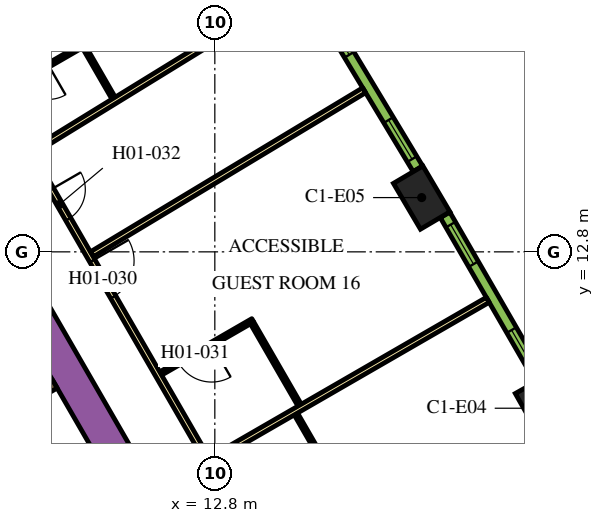
"""IFC4 building model, lengths in metres.
Left out: names, types, materials, properties, quantities, classifications, styles, units other than length and angle.
Written with IfcOpenShell. Run it as: python <this file> out.ifc"""

import sys

from ifc_helpers import new_model, si_unit, direction, frame, frame_2d, origin, origin_2d, place, context, subcontext, project, spatial, rectangle, extrude, element, fill, save


model = new_model("IFC4")
c1 = context("Model", 3, precision=1e-05, world=origin(), true_north=direction((0.0, 1.0)))
c2 = subcontext(c1, "Body", "Model", "MODEL_VIEW")
j1 = project(units=[si_unit("LENGTHUNIT", "METRE"), si_unit("PLANEANGLEUNIT", "RADIAN")], contexts=[c1])
p1 = place(None, origin())
s1 = spatial("IfcSite", under=j1, at=p1, CompositionType="ELEMENT")
p2 = place(p1, origin())
s2 = spatial("IfcBuilding", under=s1, at=p2, CompositionType="ELEMENT")
p3 = place(p2, frame((0.0, 0.0, 31.5)))
s3 = spatial("IfcBuildingStorey", under=s2, at=p3, CompositionType="ELEMENT", Elevation=31.5)
for number, where, z_axis, x_axis in (
    (1, (21.443, 8.685, 0.0), (0.0, 0.0, 1.0), (-0.492, 0.871, 0.0)),
    (2, (18.243, 14.228, 0.0), (0.0, 0.0, 1.0), (-0.508, 0.861, 0.0)),
):
    element("IfcColumn", number, at=place(p3, frame(where, z_axis=z_axis, x_axis=x_axis)), inside=s3, PredefinedType="COLUMN", context=c2, shape_type="SweptSolid", body=[
        extrude(rectangle(XDim=1.4, YDim=0.9, at=origin_2d()), origin(), (0.0, 0.0, 1.0), 3.9),
    ])
p4 = place(p3, frame((6.711, 13.476, 0.0), z_axis=(0.0, 0.0, 1.0), x_axis=(0.500002723396, -0.866023831425, 0.0)))
e3 = element("IfcWall", 3, at=p4, inside=s3, PredefinedType="SOLIDWALL", context=c2, shape_type="SweptSolid", body=[
    extrude(rectangle(XDim=20.334, YDim=0.9, at=frame_2d((10.167, 0.0))), origin(), (0.0, 0.0, 1.0), 3.9),
])
p5 = place(p3, frame((6.684, 8.224, 0.0), z_axis=(0.0, 0.0, 1.0), x_axis=(0.86605622881, 0.499946605688, 0.0)))
e4 = element("IfcWall", 4, at=p5, inside=s3, PredefinedType="SOLIDWALL", context=c2, shape_type="SweptSolid", body=[
    extrude(rectangle(XDim=2.2, YDim=0.25, at=frame_2d((1.1, 0.0))), origin(), (0.0, 0.0, 1.0), 3.9),
])
p6 = place(p3, frame((11.553, -0.46, 0.0), z_axis=(0.0, 0.0, 1.0), x_axis=(-0.500006514828, 0.866021642414, 0.0)))
e5 = element("IfcWall", 5, at=p6, inside=s3, PredefinedType="SOLIDWALL", context=c2, shape_type="SweptSolid", body=[
    extrude(rectangle(XDim=12.35, YDim=0.25, at=frame_2d((6.175, 0.0))), origin(), (0.0, 0.0, 1.0), 3.9),
])
p7 = place(p6, frame((0.585, 0.0, 0.0)))
e6 = element("IfcOpeningElement", 6, at=p7, cuts=e5, PredefinedType="OPENING", context=c2, shape_type="SweptSolid", body=[
    extrude(rectangle(XDim=1.1, YDim=2.1, at=frame_2d((0.55, 1.05))), frame((0.0, 0.135, 0.0), z_axis=(0.0, -1.0, 0.0), x_axis=(1.0, 0.0, 0.0)), (0.0, 0.0, 1.0), 0.27),
])
p8 = place(p6, frame((3.105, 0.0, 0.0)))
e7 = element("IfcOpeningElement", 7, at=p8, cuts=e5, PredefinedType="OPENING", context=c2, shape_type="SweptSolid", body=[
    extrude(rectangle(XDim=1.1, YDim=2.1, at=frame_2d((0.55, 1.05))), frame((0.0, 0.135, 0.0), z_axis=(0.0, -1.0, 0.0), x_axis=(1.0, 0.0, 0.0)), (0.0, 0.0, 1.0), 0.27),
])
p9 = place(p6, frame((5.625, 0.0, 0.0)))
e8 = element("IfcOpeningElement", 8, at=p9, cuts=e5, PredefinedType="OPENING", context=c2, shape_type="SweptSolid", body=[
    extrude(rectangle(XDim=1.1, YDim=2.1, at=frame_2d((0.55, 1.05))), frame((0.0, 0.135, 0.0), z_axis=(0.0, -1.0, 0.0), x_axis=(1.0, 0.0, 0.0)), (0.0, 0.0, 1.0), 0.27),
])
p10 = place(p3, frame((8.565, -2.185, 0.0), z_axis=(0.0, 0.0, 1.0), x_axis=(-0.499997954832, 0.866026584559, 0.0)))
e9 = element("IfcWall", 9, at=p10, inside=s3, PredefinedType="SOLIDWALL", context=c2, shape_type="SweptSolid", body=[
    extrude(rectangle(XDim=12.35, YDim=0.25, at=frame_2d((6.175, 0.0))), origin(), (0.0, 0.0, 1.0), 3.9),
])
p11 = place(p10, frame((5.725, 0.0, 0.0)))
e10 = element("IfcOpeningElement", 10, at=p11, cuts=e9, PredefinedType="OPENING", context=c2, shape_type="SweptSolid", body=[
    extrude(rectangle(XDim=0.9, YDim=2.1, at=frame_2d((0.45, 1.05))), frame((0.0, 0.135, 0.0), z_axis=(0.0, -1.0, 0.0), x_axis=(1.0, 0.0, 0.0)), (0.0, 0.0, 1.0), 0.27),
])
p12 = place(p3, frame((6.163, 18.475, 0.0), z_axis=(0.0, 0.0, 1.0), x_axis=(0.500001317485, -0.866024643133, 0.0)))
e11 = element("IfcWall", 11, at=p12, inside=s3, PredefinedType="PARTITIONING", context=c2, shape_type="SweptSolid", body=[
    extrude(rectangle(XDim=25.767, YDim=0.15, at=frame_2d((12.883, 0.0))), origin(), (0.0, 0.0, 1.0), 2.75),
])
p13 = place(p12, frame((24.586, 0.0, 0.0)))
e12 = element("IfcOpeningElement", 12, at=p13, cuts=e11, PredefinedType="OPENING", context=c2, shape_type="SweptSolid", body=[
    extrude(rectangle(XDim=1.0, YDim=2.1, at=frame_2d((0.5, 1.05))), frame((0.0, 0.085, 0.0), z_axis=(0.0, -1.0, 0.0), x_axis=(1.0, 0.0, 0.0)), (0.0, 0.0, 1.0), 0.17),
])
p14 = place(p12, frame((19.319, 0.0, 0.0)))
e13 = element("IfcOpeningElement", 13, at=p14, cuts=e11, PredefinedType="OPENING", context=c2, shape_type="SweptSolid", body=[
    extrude(rectangle(XDim=1.0, YDim=2.1, at=frame_2d((0.5, 1.05))), frame((0.0, 0.085, 0.0), z_axis=(0.0, -1.0, 0.0), x_axis=(1.0, 0.0, 0.0)), (0.0, 0.0, 1.0), 0.17),
])
p15 = place(p12, frame((18.012, 0.0, 0.0)))
e14 = element("IfcOpeningElement", 14, at=p15, cuts=e11, PredefinedType="OPENING", context=c2, shape_type="SweptSolid", body=[
    extrude(rectangle(XDim=1.0, YDim=2.1, at=frame_2d((0.5, 1.05))), frame((0.0, 0.085, 0.0), z_axis=(0.0, -1.0, 0.0), x_axis=(1.0, 0.0, 0.0)), (0.0, 0.0, 1.0), 0.17),
])
p16 = place(p12, frame((6.824, 0.0, 0.0)))
e15 = element("IfcOpeningElement", 15, at=p16, cuts=e11, PredefinedType="OPENING", context=c2, shape_type="SweptSolid", body=[
    extrude(rectangle(XDim=1.1, YDim=2.1, at=frame_2d((0.55, 1.05))), frame((0.0, 0.085, 0.0), z_axis=(0.0, -1.0, 0.0), x_axis=(1.0, 0.0, 0.0)), (0.0, 0.0, 1.0), 0.17),
])
p17 = place(p12, frame((4.658, 0.0, 0.0)))
e16 = element("IfcOpeningElement", 16, at=p17, cuts=e11, PredefinedType="OPENING", context=c2, shape_type="SweptSolid", body=[
    extrude(rectangle(XDim=0.9, YDim=2.1, at=frame_2d((0.45, 1.05))), frame((0.0, 0.085, 0.0), z_axis=(0.0, -1.0, 0.0), x_axis=(1.0, 0.0, 0.0)), (0.0, 0.0, 1.0), 0.17),
])
p18 = place(p12, frame((0.18, 0.0, 0.0)))
e17 = element("IfcOpeningElement", 17, at=p18, cuts=e11, PredefinedType="OPENING", context=c2, shape_type="SweptSolid", body=[
    extrude(rectangle(XDim=1.0, YDim=2.1, at=frame_2d((0.5, 1.05))), frame((0.0, 0.085, 0.0), z_axis=(0.0, -1.0, 0.0), x_axis=(1.0, 0.0, 0.0)), (0.0, 0.0, 1.0), 0.17),
])
p19 = place(p3, frame((14.558, 19.475, 0.0), z_axis=(0.0, 0.0, 1.0), x_axis=(-0.851829455142, -0.523819223925, 0.0)))
e18 = element("IfcWall", 18, at=p19, inside=s3, PredefinedType="PARTITIONING", context=c2, shape_type="SweptSolid", body=[
    extrude(rectangle(XDim=7.688, YDim=0.15, at=frame_2d((3.844, 0.0))), origin(), (0.0, 0.0, 1.0), 2.75),
])
p20 = place(p3, frame((16.729, 17.052, 0.0), z_axis=(0.0, 0.0, 1.0), x_axis=(-0.856630606266, -0.515930232113, 0.0)))
e19 = element("IfcWall", 19, at=p20, inside=s3, PredefinedType="PARTITIONING", context=c2, shape_type="SweptSolid", body=[
    extrude(rectangle(XDim=8.355, YDim=0.15, at=frame_2d((4.178, 0.0))), origin(), (0.0, 0.0, 1.0), 2.75),
])
p21 = place(p3, frame((19.982, 11.537, 0.0), z_axis=(0.0, 0.0, 1.0), x_axis=(-0.866020994654, -0.500007636761, 0.0)))
e20 = element("IfcWall", 20, at=p21, inside=s3, PredefinedType="PARTITIONING", context=c2, shape_type="SweptSolid", body=[
    extrude(rectangle(XDim=8.423, YDim=0.15, at=frame_2d((4.211, 0.0))), origin(), (0.0, 0.0, 1.0), 2.75),
])
p22 = place(p3, frame((15.779, 7.071, 0.0), z_axis=(0.0, 0.0, 1.0), x_axis=(-0.499976720371, 0.866038843867, 0.0)))
e21 = element("IfcWall", 21, at=p22, inside=s3, PredefinedType="PARTITIONING", context=c2, shape_type="SweptSolid", body=[
    extrude(rectangle(XDim=1.69, YDim=0.1, at=frame_2d((0.845, 0.0))), origin(), (0.0, 0.0, 1.0), 2.75),
])
p23 = place(p3, frame((13.799, 10.999, 0.0), z_axis=(0.0, 0.0, 1.0), x_axis=(-0.866034573852, -0.49998411664, 0.0)))
e22 = element("IfcWall", 22, at=p23, inside=s3, PredefinedType="PARTITIONING", context=c2, shape_type="SweptSolid", body=[
    extrude(rectangle(XDim=2.8, YDim=0.1, at=frame_2d((1.4, 0.0))), origin(), (0.0, 0.0, 1.0), 2.75),
])
p24 = place(p23, frame((1.25, 0.0, 0.0)))
e23 = element("IfcOpeningElement", 23, at=p24, cuts=e22, PredefinedType="OPENING", context=c2, shape_type="SweptSolid", body=[
    extrude(rectangle(XDim=1.0, YDim=2.1, at=frame_2d((0.5, 1.05))), frame((0.0, 0.06, 0.0), z_axis=(0.0, -1.0, 0.0), x_axis=(1.0, 0.0, 0.0)), (0.0, 0.0, 1.0), 0.12),
])
p25 = place(p3, frame((13.781, 10.931, 0.0), z_axis=(0.0, 0.0, 1.0), x_axis=(0.500004234368, -0.866022959057, 0.0)))
e24 = element("IfcWall", 24, at=p25, inside=s3, PredefinedType="PARTITIONING", context=c2, shape_type="SweptSolid", body=[
    extrude(rectangle(XDim=2.5, YDim=0.1, at=frame_2d((1.25, 0.0))), origin(), (0.0, 0.0, 1.0), 2.75),
])
p26 = place(p3, frame((9.375, 18.261, 0.0), z_axis=(0.0, 0.0, 1.0), x_axis=(-0.866021400173, -0.500006934395, 0.0)))
e25 = element("IfcWall", 25, at=p26, inside=s3, PredefinedType="PARTITIONING", context=c2, shape_type="SweptSolid", body=[
    extrude(rectangle(XDim=2.6, YDim=0.1, at=frame_2d((1.3, 0.0))), origin(), (0.0, 0.0, 1.0), 2.75),
])
p27 = place(p26, frame((1.1, 0.0, 0.0)))
e26 = element("IfcOpeningElement", 26, at=p27, cuts=e25, PredefinedType="OPENING", context=c2, shape_type="SweptSolid", body=[
    extrude(rectangle(XDim=0.9, YDim=2.1, at=frame_2d((0.45, 1.05))), frame((0.0, 0.06, 0.0), z_axis=(0.0, -1.0, 0.0), x_axis=(1.0, 0.0, 0.0)), (0.0, 0.0, 1.0), 0.12),
])
p28 = place(p3, frame((9.357, 18.193, 0.0), z_axis=(0.0, 0.0, 1.0), x_axis=(0.499899694197, -0.866083307622, 0.0)))
e27 = element("IfcWall", 27, at=p28, inside=s3, PredefinedType="PARTITIONING", context=c2, shape_type="SweptSolid", body=[
    extrude(rectangle(XDim=1.55, YDim=0.1, at=frame_2d((0.775, 0.0))), origin(), (0.0, 0.0, 1.0), 2.75),
])
p29 = place(p3, frame((21.357, 9.445, 0.0), z_axis=(0.0, 0.0, 1.0), x_axis=(-0.50002123722, 0.866013142123, 0.0)))
e28 = element("IfcWall", 28, at=p29, inside=s3, PredefinedType="SOLIDWALL", context=c2, shape_type="SweptSolid", body=[
    extrude(rectangle(XDim=4.998, YDim=0.29, at=frame_2d((2.499, 0.0))), origin(), (0.0, 0.0, 1.0), 3.65),
])
p30 = place(p29, frame((0.297, 0.0, 0.9)))
e29 = element("IfcOpeningElement", 29, at=p30, cuts=e28, PredefinedType="OPENING", context=c2, shape_type="SweptSolid", body=[
    extrude(rectangle(XDim=1.2, YDim=2.15, at=frame_2d((0.6, 1.075))), frame((0.0, 0.155, 0.0), z_axis=(0.0, -1.0, 0.0), x_axis=(1.0, 0.0, 0.0)), (0.0, 0.0, 1.0), 0.31),
])
p31 = place(p29, frame((3.501, 0.0, 0.9)))
e30 = element("IfcOpeningElement", 30, at=p31, cuts=e28, PredefinedType="OPENING", context=c2, shape_type="SweptSolid", body=[
    extrude(rectangle(XDim=1.2, YDim=2.15, at=frame_2d((0.6, 1.075))), frame((0.0, 0.155, 0.0), z_axis=(0.0, -1.0, 0.0), x_axis=(1.0, 0.0, 0.0)), (0.0, 0.0, 1.0), 0.31),
])
p32 = place(p3, frame((18.143, 14.986, 0.0), z_axis=(0.0, 0.0, 1.0), x_axis=(-0.515938796285, 0.856625448191, 0.0)))
e31 = element("IfcWall", 31, at=p32, inside=s3, PredefinedType="SOLIDWALL", context=c2, shape_type="SweptSolid", body=[
    extrude(rectangle(XDim=4.998, YDim=0.29, at=frame_2d((2.499, 0.0))), origin(), (0.0, 0.0, 1.0), 3.65),
])
p33 = place(p32, frame((0.297, 0.0, 0.9)))
e32 = element("IfcOpeningElement", 32, at=p33, cuts=e31, PredefinedType="OPENING", context=c2, shape_type="SweptSolid", body=[
    extrude(rectangle(XDim=1.2, YDim=2.15, at=frame_2d((0.6, 1.075))), frame((0.0, 0.155, 0.0), z_axis=(0.0, -1.0, 0.0), x_axis=(1.0, 0.0, 0.0)), (0.0, 0.0, 1.0), 0.31),
])
p34 = place(p32, frame((3.501, 0.0, 0.9)))
e33 = element("IfcOpeningElement", 33, at=p34, cuts=e31, PredefinedType="OPENING", context=c2, shape_type="SweptSolid", body=[
    extrude(rectangle(XDim=1.2, YDim=2.15, at=frame_2d((0.6, 1.075))), frame((0.0, 0.155, 0.0), z_axis=(0.0, -1.0, 0.0), x_axis=(1.0, 0.0, 0.0)), (0.0, 0.0, 1.0), 0.31),
])
p35 = place(p16, origin())
e34 = element("IfcDoor", 34, at=p35, inside=s3, OperationType="SINGLE_SWING_LEFT", PredefinedType="DOOR", context=c2, shape_type="SweptSolid", body=[
    extrude(rectangle(XDim=1.1, YDim=2.1, at=frame_2d((0.55, 1.05))), frame((0.0, 0.025, 0.0), z_axis=(0.0, -1.0, 0.0), x_axis=(1.0, 0.0, 0.0)), (0.0, 0.0, 1.0), 0.05),
])
fill(e15, e34)
p36 = place(p24, origin())
e35 = element("IfcDoor", 35, at=p36, inside=s3, OperationType="SINGLE_SWING_LEFT", PredefinedType="DOOR", context=c2, shape_type="SweptSolid", body=[
    extrude(rectangle(XDim=1.0, YDim=2.1, at=frame_2d((0.5, 1.05))), frame((0.0, 0.025, 0.0), z_axis=(0.0, -1.0, 0.0), x_axis=(1.0, 0.0, 0.0)), (0.0, 0.0, 1.0), 0.05),
])
fill(e23, e35)
p37 = place(p17, origin())
e36 = element("IfcDoor", 36, at=p37, inside=s3, OperationType="SINGLE_SWING_LEFT", PredefinedType="DOOR", context=c2, shape_type="SweptSolid", body=[
    extrude(rectangle(XDim=0.9, YDim=2.1, at=frame_2d((0.45, 1.05))), frame((0.0, 0.025, 0.0), z_axis=(0.0, -1.0, 0.0), x_axis=(1.0, 0.0, 0.0)), (0.0, 0.0, 1.0), 0.05),
])
fill(e16, e36)
p38 = place(p30, origin())
e37 = element("IfcWindow", 37, at=p38, inside=s3, PartitioningType="DOUBLE_PANEL_VERTICAL", PredefinedType="WINDOW", context=c2, shape_type="SweptSolid", body=[
    extrude(rectangle(XDim=1.2, YDim=2.15, at=frame_2d((0.6, 1.075))), frame((0.0, 0.015, 0.0), z_axis=(0.0, -1.0, 0.0), x_axis=(1.0, 0.0, 0.0)), (0.0, 0.0, 1.0), 0.06),
])
fill(e29, e37)
p39 = place(p31, origin())
e38 = element("IfcWindow", 38, at=p39, inside=s3, PartitioningType="DOUBLE_PANEL_VERTICAL", PredefinedType="WINDOW", context=c2, shape_type="SweptSolid", body=[
    extrude(rectangle(XDim=1.2, YDim=2.15, at=frame_2d((0.6, 1.075))), frame((0.0, 0.015, 0.0), z_axis=(0.0, -1.0, 0.0), x_axis=(1.0, 0.0, 0.0)), (0.0, 0.0, 1.0), 0.06),
])
fill(e30, e38)
p40 = place(p33, origin())
e39 = element("IfcWindow", 39, at=p40, inside=s3, PartitioningType="DOUBLE_PANEL_VERTICAL", PredefinedType="WINDOW", context=c2, shape_type="SweptSolid", body=[
    extrude(rectangle(XDim=1.2, YDim=2.15, at=frame_2d((0.6, 1.075))), frame((0.0, 0.015, 0.0), z_axis=(0.0, -1.0, 0.0), x_axis=(1.0, 0.0, 0.0)), (0.0, 0.0, 1.0), 0.06),
])
fill(e32, e39)
p41 = place(p34, origin())
e40 = element("IfcWindow", 40, at=p41, inside=s3, PartitioningType="DOUBLE_PANEL_VERTICAL", PredefinedType="WINDOW", context=c2, shape_type="SweptSolid", body=[
    extrude(rectangle(XDim=1.2, YDim=2.15, at=frame_2d((0.6, 1.075))), frame((0.0, 0.015, 0.0), z_axis=(0.0, -1.0, 0.0), x_axis=(1.0, 0.0, 0.0)), (0.0, 0.0, 1.0), 0.06),
])
fill(e33, e40)
save(model, sys.argv[1])
